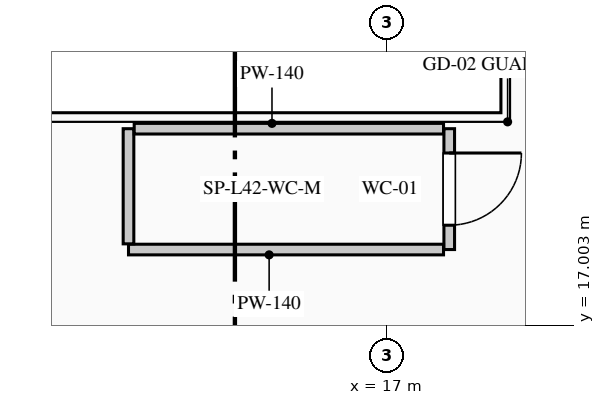
"""IFC4 building model, lengths in metres.
Left out: names, types, materials, properties, quantities, classifications, styles, units other than length and angle.
Written with IfcOpenShell. Run it as: python <this file> out.ifc"""

import sys

from ifc_helpers import new_model, si_unit, direction, frame, frame_2d, origin, place, context, subcontext, project, spatial, rectangle, extrude, element, fill, save


model = new_model("IFC4")
c1 = context("Model", 3, precision=1e-05, world=origin(), true_north=direction((0.0, 1.0)))
c2 = subcontext(c1, "Body", "Model", "MODEL_VIEW")
j1 = project(units=[si_unit("LENGTHUNIT", "METRE"), si_unit("PLANEANGLEUNIT", "RADIAN")], contexts=[c1])
p1 = place(None, origin())
s1 = spatial("IfcSite", under=j1, at=p1, CompositionType="ELEMENT")
p2 = place(p1, origin())
s2 = spatial("IfcBuilding", under=s1, at=p2, CompositionType="ELEMENT")
p3 = place(p2, frame((0.0, 0.0, 178.55)))
s3 = spatial("IfcBuildingStorey", under=s2, at=p3, CompositionType="ELEMENT", Elevation=178.55)
p4 = place(p3, frame((17.82, 19.59, 0.0), z_axis=(0.0, 0.0, 1.0), x_axis=(0.0, -1.0, 0.0)))
e1 = element("IfcWall", 1, at=p4, inside=s3, PredefinedType="PARTITIONING", context=c2, shape_type="SweptSolid", body=[
    extrude(rectangle(XDim=1.59, YDim=0.14, at=frame_2d((0.795, 0.0))), origin(), (0.0, 0.0, 1.0), 4.95),
])
p5 = place(p4, frame((0.32, 0.0, 0.0)))
e2 = element("IfcOpeningElement", 2, at=p5, cuts=e1, PredefinedType="OPENING", context=c2, shape_type="SweptSolid", body=[
    extrude(rectangle(XDim=0.95, YDim=2.15, at=frame_2d((0.475, 1.075))), frame((0.0, 0.08, 0.0), z_axis=(0.0, -1.0, 0.0), x_axis=(1.0, 0.0, 0.0)), (0.0, 0.0, 1.0), 0.16),
])
p6 = place(p3, frame((17.745, 18.0, 0.0), z_axis=(0.0, 0.0, 1.0), x_axis=(-1.0, 0.0, 0.0)))
e3 = element("IfcWall", 3, at=p6, inside=s3, PredefinedType="PARTITIONING", context=c2, shape_type="SweptSolid", body=[
    extrude(rectangle(XDim=4.145, YDim=0.14, at=frame_2d((2.073, 0.0))), origin(), (0.0, 0.0, 1.0), 4.95),
])
p7 = place(p3, frame((13.6, 18.075, 0.0), z_axis=(0.0, 0.0, 1.0), x_axis=(0.0, 1.0, 0.0)))
e4 = element("IfcWall", 4, at=p7, inside=s3, PredefinedType="PARTITIONING", context=c2, shape_type="SweptSolid", body=[
    extrude(rectangle(XDim=1.515, YDim=0.14, at=frame_2d((0.758, 0.0))), origin(), (0.0, 0.0, 1.0), 4.95),
])
p8 = place(p3, frame((13.675, 19.59, 0.0), z_axis=(0.0, 0.0, 1.0), x_axis=(1.0, 0.0, 0.0)))
e5 = element("IfcWall", 5, at=p8, inside=s3, PredefinedType="PARTITIONING", context=c2, shape_type="SweptSolid", body=[
    extrude(rectangle(XDim=4.07, YDim=0.14, at=frame_2d((2.035, 0.0))), origin(), (0.0, 0.0, 1.0), 4.95),
])
p9 = place(p5, origin())
e6 = element("IfcDoor", 6, at=p9, inside=s3, OperationType="SINGLE_SWING_LEFT", PredefinedType="DOOR", context=c2, shape_type="SweptSolid", body=[
    extrude(rectangle(XDim=0.95, YDim=2.15, at=frame_2d((0.475, 1.075))), frame((0.0, 0.025, 0.0), z_axis=(0.0, -1.0, 0.0), x_axis=(1.0, 0.0, 0.0)), (0.0, 0.0, 1.0), 0.05),
])
fill(e2, e6)
save(model, sys.argv[1])
